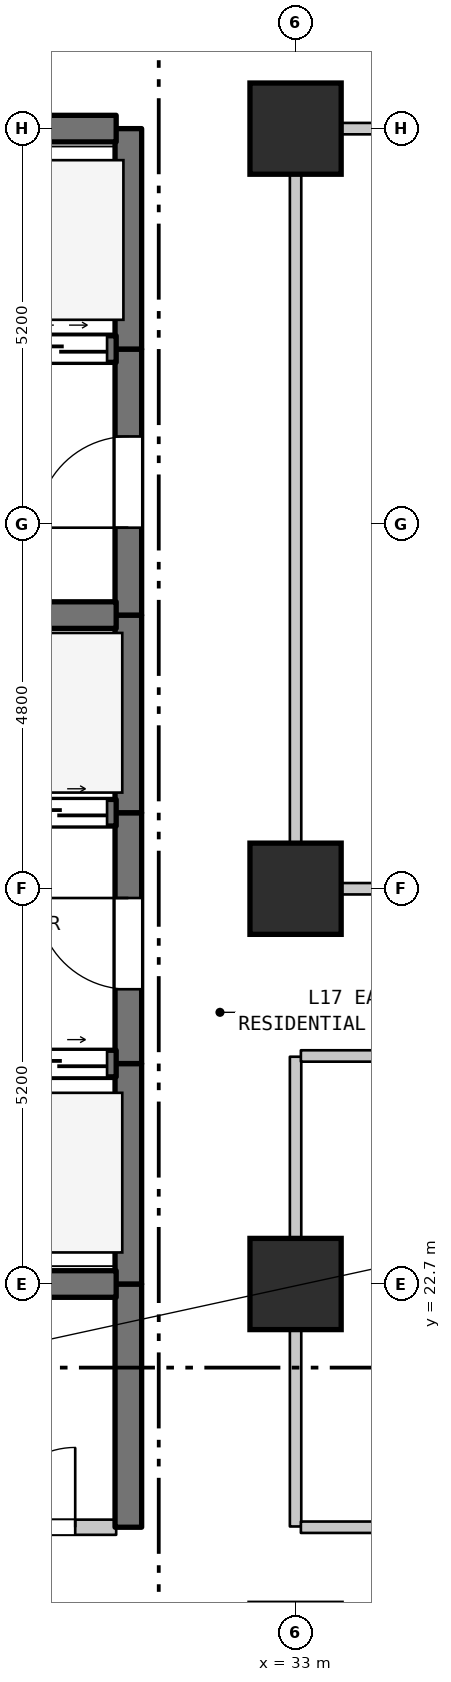
"""IFC4 building model, lengths in metres.
Left out: names, types, materials, properties, quantities, classifications, styles, units other than length and angle.
Written with IfcOpenShell. Run it as: python <this file> out.ifc"""

import sys

from ifc_helpers import new_model, si_unit, direction, frame, frame_2d, origin, origin_2d, place, context, subcontext, project, spatial, rectangle, extrude, element, fill, save


model = new_model("IFC4")
c1 = context("Model", 3, precision=1e-05, world=origin(), true_north=direction((0.0, 1.0)))
c2 = subcontext(c1, "Body", "Model", "MODEL_VIEW")
j1 = project(units=[si_unit("LENGTHUNIT", "METRE"), si_unit("PLANEANGLEUNIT", "RADIAN")], contexts=[c1])
p1 = place(None, origin())
s1 = spatial("IfcSite", under=j1, at=p1, CompositionType="ELEMENT")
p2 = place(p1, origin())
s2 = spatial("IfcBuilding", under=s1, at=p2, CompositionType="ELEMENT")
p3 = place(p2, frame((0.0, 0.0, 73.8)))
s3 = spatial("IfcBuildingStorey", under=s2, at=p3, CompositionType="ELEMENT", Elevation=73.8)
for number, where, z_axis, x_axis in (
    (1, (33.0, 22.7, 0.0), (0.0, 0.0, 1.0), (1.0, 0.0, 0.0)),
    (2, (33.0, 27.9, 0.0), (0.0, 0.0, 1.0), (1.0, 0.0, 0.0)),
    (3, (33.0, 37.9, 0.0), (0.0, 0.0, 1.0), (1.0, 0.0, 0.0)),
):
    element("IfcColumn", number, at=place(p3, frame(where, z_axis=z_axis, x_axis=x_axis)), inside=s3, PredefinedType="COLUMN", context=c2, shape_type="SweptSolid", body=[
        extrude(rectangle(XDim=1.2, YDim=1.2, at=origin_2d()), origin(), (0.0, 0.0, 1.0), 3.7),
    ])
p4 = place(p3, frame((30.8, 19.5, 0.0), z_axis=(0.0, 0.0, 1.0), x_axis=(0.0, 1.0, 0.0)))
e4 = element("IfcWall", 4, at=p4, inside=s3, PredefinedType="SHEAR", context=c2, shape_type="SweptSolid", body=[
    extrude(rectangle(XDim=3.2, YDim=0.35, at=frame_2d((1.6, 0.0))), origin(), (0.0, 0.0, 1.0), 3.385),
])
p5 = place(p3, frame((30.8, 22.7, 0.0), z_axis=(0.0, 0.0, 1.0), x_axis=(0.0, 1.0, 0.0)))
e5 = element("IfcWall", 5, at=p5, inside=s3, PredefinedType="SHEAR", context=c2, shape_type="SweptSolid", body=[
    extrude(rectangle(XDim=2.9, YDim=0.35, at=frame_2d((1.45, 0.0))), origin(), (0.0, 0.0, 1.0), 3.385),
])
p6 = place(p3, frame((30.8, 25.6, 0.0), z_axis=(0.0, 0.0, 1.0), x_axis=(0.0, 1.0, 0.0)))
e6 = element("IfcWall", 6, at=p6, inside=s3, PredefinedType="SHEAR", context=c2, shape_type="SweptSolid", body=[
    extrude(rectangle(XDim=3.3, YDim=0.35, at=frame_2d((1.65, 0.0))), origin(), (0.0, 0.0, 1.0), 3.385),
])
p7 = place(p6, frame((0.978, 0.0, 0.0)))
e7 = element("IfcOpeningElement", 7, at=p7, cuts=e6, PredefinedType="OPENING", context=c2, shape_type="SweptSolid", body=[
    extrude(rectangle(XDim=1.2, YDim=2.2, at=frame_2d((0.6, 1.1))), frame((0.0, 0.185, 0.0), z_axis=(0.0, -1.0, 0.0), x_axis=(1.0, 0.0, 0.0)), (0.0, 0.0, 1.0), 0.37),
])
p8 = place(p3, frame((30.8, 28.9, 0.0), z_axis=(0.0, 0.0, 1.0), x_axis=(0.0, 1.0, 0.0)))
e8 = element("IfcWall", 8, at=p8, inside=s3, PredefinedType="SHEAR", context=c2, shape_type="SweptSolid", body=[
    extrude(rectangle(XDim=2.6, YDim=0.35, at=frame_2d((1.3, 0.0))), origin(), (0.0, 0.0, 1.0), 3.385),
])
p9 = place(p3, frame((30.8, 31.5, 0.0), z_axis=(0.0, 0.0, 1.0), x_axis=(0.0, 1.0, 0.0)))
e9 = element("IfcWall", 9, at=p9, inside=s3, PredefinedType="SHEAR", context=c2, shape_type="SweptSolid", body=[
    extrude(rectangle(XDim=3.5, YDim=0.35, at=frame_2d((1.75, 0.0))), origin(), (0.0, 0.0, 1.0), 3.385),
])
p10 = place(p9, frame((1.15, 0.0, 0.0)))
e10 = element("IfcOpeningElement", 10, at=p10, cuts=e9, PredefinedType="OPENING", context=c2, shape_type="SweptSolid", body=[
    extrude(rectangle(XDim=1.2, YDim=2.2, at=frame_2d((0.6, 1.1))), frame((0.0, 0.185, 0.0), z_axis=(0.0, -1.0, 0.0), x_axis=(1.0, 0.0, 0.0)), (0.0, 0.0, 1.0), 0.37),
])
p11 = place(p3, frame((30.8, 35.0, 0.0), z_axis=(0.0, 0.0, 1.0), x_axis=(0.0, 1.0, 0.0)))
e11 = element("IfcWall", 11, at=p11, inside=s3, PredefinedType="SHEAR", context=c2, shape_type="SweptSolid", body=[
    extrude(rectangle(XDim=2.9, YDim=0.35, at=frame_2d((1.45, 0.0))), origin(), (0.0, 0.0, 1.0), 3.385),
])
p12 = place(p3, frame((33.0, 19.51, 0.0), z_axis=(0.0, 0.0, 1.0), x_axis=(0.0, 1.0, 0.0)))
e12 = element("IfcWall", 12, at=p12, inside=s3, PredefinedType="STANDARD", context=c2, shape_type="SweptSolid", body=[
    extrude(rectangle(XDim=6.18, YDim=0.15, at=frame_2d((3.09, 0.0))), origin(), (0.0, 0.0, 1.0), 2.885),
])
p13 = place(p3, frame((33.0, 27.91, 0.0), z_axis=(0.0, 0.0, 1.0), x_axis=(0.0, 1.0, 0.0)))
e13 = element("IfcWall", 13, at=p13, inside=s3, PredefinedType="STANDARD", context=c2, shape_type="SweptSolid", body=[
    extrude(rectangle(XDim=9.98, YDim=0.15, at=frame_2d((4.99, 0.0))), origin(), (0.0, 0.0, 1.0), 2.885),
])
p14 = place(p3, frame((28.585, 19.5, 0.0), z_axis=(0.0, 0.0, 1.0), x_axis=(1.0, 0.0, 0.0)))
e14 = element("IfcWall", 14, at=p14, inside=s3, PredefinedType="STANDARD", context=c2, shape_type="SweptSolid", body=[
    extrude(rectangle(XDim=2.055, YDim=0.2, at=frame_2d((1.027, 0.0))), origin(), (0.0, 0.0, 1.0), 3.385),
])
p15 = place(p14, frame((0.466, 0.0, 0.0)))
e15 = element("IfcOpeningElement", 15, at=p15, cuts=e14, PredefinedType="OPENING", context=c2, shape_type="SweptSolid", body=[
    extrude(rectangle(XDim=1.05, YDim=2.15, at=frame_2d((0.525, 1.075))), frame((0.0, 0.11, 0.0), z_axis=(0.0, -1.0, 0.0), x_axis=(1.0, 0.0, 0.0)), (0.0, 0.0, 1.0), 0.22),
])
p16 = place(p3, frame((33.07, 19.5, 0.0), z_axis=(0.0, 0.0, 1.0), x_axis=(1.0, 0.0, 0.0)))
e16 = element("IfcWall", 16, at=p16, inside=s3, PredefinedType="STANDARD", context=c2, shape_type="SweptSolid", body=[
    extrude(rectangle(XDim=33.27, YDim=0.15, at=frame_2d((16.635, 0.0))), origin(), (0.0, 0.0, 1.0), 3.385),
])
p17 = place(p16, frame((16.065, 0.0, 0.0)))
e17 = element("IfcOpeningElement", 17, at=p17, cuts=e16, PredefinedType="OPENING", context=c2, shape_type="SweptSolid", body=[
    extrude(rectangle(XDim=1.0, YDim=2.15, at=frame_2d((0.5, 1.075))), frame((0.0, 0.085, 0.0), z_axis=(0.0, -1.0, 0.0), x_axis=(1.0, 0.0, 0.0)), (0.0, 0.0, 1.0), 0.17),
])
p18 = place(p3, frame((28.585, 22.7, 0.0), z_axis=(0.0, 0.0, 1.0), x_axis=(1.0, 0.0, 0.0)))
e18 = element("IfcWall", 18, at=p18, inside=s3, PredefinedType="SHEAR", context=c2, shape_type="SweptSolid", body=[
    extrude(rectangle(XDim=2.055, YDim=0.35, at=frame_2d((1.027, 0.0))), origin(), (0.0, 0.0, 1.0), 3.385),
])
p19 = place(p3, frame((27.46, 25.6, 0.0), z_axis=(0.0, 0.0, 1.0), x_axis=(1.0, 0.0, 0.0)))
e19 = element("IfcWall", 19, at=p19, inside=s3, PredefinedType="SHEAR", context=c2, shape_type="SweptSolid", body=[
    extrude(rectangle(XDim=3.18, YDim=0.35, at=frame_2d((1.59, 0.0))), origin(), (0.0, 0.0, 1.0), 3.385),
])
p20 = place(p19, frame((0.12, 0.0, 0.0)))
e20 = element("IfcOpeningElement", 20, at=p20, cuts=e19, PredefinedType="OPENING", context=c2, shape_type="SweptSolid", body=[
    extrude(rectangle(XDim=1.25, YDim=2.2, at=frame_2d((0.625, 1.1))), frame((0.0, 0.185, 0.0), z_axis=(0.0, -1.0, 0.0), x_axis=(1.0, 0.0, 0.0)), (0.0, 0.0, 1.0), 0.37),
])
p21 = place(p19, frame((1.81, 0.0, 0.0)))
e21 = element("IfcOpeningElement", 21, at=p21, cuts=e19, PredefinedType="OPENING", context=c2, shape_type="SweptSolid", body=[
    extrude(rectangle(XDim=1.25, YDim=2.2, at=frame_2d((0.625, 1.1))), frame((0.0, 0.185, 0.0), z_axis=(0.0, -1.0, 0.0), x_axis=(1.0, 0.0, 0.0)), (0.0, 0.0, 1.0), 0.37),
])
p22 = place(p3, frame((33.07, 25.7, 0.0), z_axis=(0.0, 0.0, 1.0), x_axis=(1.0, 0.0, 0.0)))
e22 = element("IfcWall", 22, at=p22, inside=s3, PredefinedType="STANDARD", context=c2, shape_type="SweptSolid", body=[
    extrude(rectangle(XDim=30.87, YDim=0.15, at=frame_2d((15.435, 0.0))), origin(), (0.0, 0.0, 1.0), 3.385),
])
p23 = place(p3, frame((33.07, 27.9, 0.0), z_axis=(0.0, 0.0, 1.0), x_axis=(1.0, 0.0, 0.0)))
e23 = element("IfcWall", 23, at=p23, inside=s3, PredefinedType="STANDARD", context=c2, shape_type="SweptSolid", body=[
    extrude(rectangle(XDim=30.87, YDim=0.15, at=frame_2d((15.435, 0.0))), origin(), (0.0, 0.0, 1.0), 2.885),
])
p24 = place(p23, frame((14.935, 0.0, 0.0)))
e24 = element("IfcOpeningElement", 24, at=p24, cuts=e23, PredefinedType="OPENING", context=c2, shape_type="SweptSolid", body=[
    extrude(rectangle(XDim=1.0, YDim=2.15, at=frame_2d((0.5, 1.075))), frame((0.0, 0.085, 0.0), z_axis=(0.0, -1.0, 0.0), x_axis=(1.0, 0.0, 0.0)), (0.0, 0.0, 1.0), 0.17),
])
p25 = place(p3, frame((27.46, 28.9, 0.0), z_axis=(0.0, 0.0, 1.0), x_axis=(1.0, 0.0, 0.0)))
e25 = element("IfcWall", 25, at=p25, inside=s3, PredefinedType="SHEAR", context=c2, shape_type="SweptSolid", body=[
    extrude(rectangle(XDim=3.18, YDim=0.35, at=frame_2d((1.59, 0.0))), origin(), (0.0, 0.0, 1.0), 3.385),
])
p26 = place(p25, frame((0.12, 0.0, 0.0)))
e26 = element("IfcOpeningElement", 26, at=p26, cuts=e25, PredefinedType="OPENING", context=c2, shape_type="SweptSolid", body=[
    extrude(rectangle(XDim=1.25, YDim=2.2, at=frame_2d((0.625, 1.1))), frame((0.0, 0.185, 0.0), z_axis=(0.0, -1.0, 0.0), x_axis=(1.0, 0.0, 0.0)), (0.0, 0.0, 1.0), 0.37),
])
p27 = place(p25, frame((1.81, 0.0, 0.0)))
e27 = element("IfcOpeningElement", 27, at=p27, cuts=e25, PredefinedType="OPENING", context=c2, shape_type="SweptSolid", body=[
    extrude(rectangle(XDim=1.25, YDim=2.2, at=frame_2d((0.625, 1.1))), frame((0.0, 0.185, 0.0), z_axis=(0.0, -1.0, 0.0), x_axis=(1.0, 0.0, 0.0)), (0.0, 0.0, 1.0), 0.37),
])
p28 = place(p3, frame((27.46, 31.5, 0.0), z_axis=(0.0, 0.0, 1.0), x_axis=(1.0, 0.0, 0.0)))
e28 = element("IfcWall", 28, at=p28, inside=s3, PredefinedType="SHEAR", context=c2, shape_type="SweptSolid", body=[
    extrude(rectangle(XDim=3.18, YDim=0.35, at=frame_2d((1.59, 0.0))), origin(), (0.0, 0.0, 1.0), 3.385),
])
p29 = place(p3, frame((19.16, 35.0, 0.0), z_axis=(0.0, 0.0, 1.0), x_axis=(1.0, 0.0, 0.0)))
e29 = element("IfcWall", 29, at=p29, inside=s3, PredefinedType="SHEAR", context=c2, shape_type="SweptSolid", body=[
    extrude(rectangle(XDim=11.48, YDim=0.35, at=frame_2d((5.74, 0.0))), origin(), (0.0, 0.0, 1.0), 3.385),
])
p30 = place(p29, frame((0.365, 0.0, 0.0)))
e30 = element("IfcOpeningElement", 30, at=p30, cuts=e29, PredefinedType="OPENING", context=c2, shape_type="SweptSolid", body=[
    extrude(rectangle(XDim=1.35, YDim=2.2, at=frame_2d((0.675, 1.1))), frame((0.0, 0.185, 0.0), z_axis=(0.0, -1.0, 0.0), x_axis=(1.0, 0.0, 0.0)), (0.0, 0.0, 1.0), 0.37),
])
p31 = place(p29, frame((2.765, 0.0, 0.0)))
e31 = element("IfcOpeningElement", 31, at=p31, cuts=e29, PredefinedType="OPENING", context=c2, shape_type="SweptSolid", body=[
    extrude(rectangle(XDim=1.35, YDim=2.2, at=frame_2d((0.675, 1.1))), frame((0.0, 0.185, 0.0), z_axis=(0.0, -1.0, 0.0), x_axis=(1.0, 0.0, 0.0)), (0.0, 0.0, 1.0), 0.37),
])
p32 = place(p29, frame((4.915, 0.0, 0.0)))
e32 = element("IfcOpeningElement", 32, at=p32, cuts=e29, PredefinedType="OPENING", context=c2, shape_type="SweptSolid", body=[
    extrude(rectangle(XDim=1.2, YDim=2.2, at=frame_2d((0.6, 1.1))), frame((0.0, 0.185, 0.0), z_axis=(0.0, -1.0, 0.0), x_axis=(1.0, 0.0, 0.0)), (0.0, 0.0, 1.0), 0.37),
])
p33 = place(p29, frame((6.665, 0.0, 0.0)))
e33 = element("IfcOpeningElement", 33, at=p33, cuts=e29, PredefinedType="OPENING", context=c2, shape_type="SweptSolid", body=[
    extrude(rectangle(XDim=1.2, YDim=2.2, at=frame_2d((0.6, 1.1))), frame((0.0, 0.185, 0.0), z_axis=(0.0, -1.0, 0.0), x_axis=(1.0, 0.0, 0.0)), (0.0, 0.0, 1.0), 0.37),
])
p34 = place(p29, frame((8.415, 0.0, 0.0)))
e34 = element("IfcOpeningElement", 34, at=p34, cuts=e29, PredefinedType="OPENING", context=c2, shape_type="SweptSolid", body=[
    extrude(rectangle(XDim=1.2, YDim=2.2, at=frame_2d((0.6, 1.1))), frame((0.0, 0.185, 0.0), z_axis=(0.0, -1.0, 0.0), x_axis=(1.0, 0.0, 0.0)), (0.0, 0.0, 1.0), 0.37),
])
p35 = place(p29, frame((10.16, 0.0, 0.0)))
e35 = element("IfcOpeningElement", 35, at=p35, cuts=e29, PredefinedType="OPENING", context=c2, shape_type="SweptSolid", body=[
    extrude(rectangle(XDim=1.2, YDim=2.2, at=frame_2d((0.6, 1.1))), frame((0.0, 0.185, 0.0), z_axis=(0.0, -1.0, 0.0), x_axis=(1.0, 0.0, 0.0)), (0.0, 0.0, 1.0), 0.37),
])
p36 = place(p3, frame((19.16, 37.9, 0.0), z_axis=(0.0, 0.0, 1.0), x_axis=(1.0, 0.0, 0.0)))
e36 = element("IfcWall", 36, at=p36, inside=s3, PredefinedType="SHEAR", context=c2, shape_type="SweptSolid", body=[
    extrude(rectangle(XDim=11.48, YDim=0.35, at=frame_2d((5.74, 0.0))), origin(), (0.0, 0.0, 1.0), 3.385),
])
p37 = place(p3, frame((33.07, 37.9, 0.0), z_axis=(0.0, 0.0, 1.0), x_axis=(1.0, 0.0, 0.0)))
e37 = element("IfcWall", 37, at=p37, inside=s3, PredefinedType="STANDARD", context=c2, shape_type="SweptSolid", body=[
    extrude(rectangle(XDim=26.935, YDim=0.15, at=frame_2d((13.467, 0.0))), origin(), (0.0, 0.0, 1.0), 3.385),
])
p38 = place(p7, origin())
e38 = element("IfcDoor", 38, at=p38, inside=s3, OperationType="SINGLE_SWING_RIGHT", PredefinedType="DOOR", context=c2, shape_type="SweptSolid", body=[
    extrude(rectangle(XDim=1.2, YDim=2.2, at=frame_2d((0.6, 1.1))), frame((0.0, 0.025, 0.0), z_axis=(0.0, -1.0, 0.0), x_axis=(1.0, 0.0, 0.0)), (0.0, 0.0, 1.0), 0.05),
])
fill(e7, e38)
p39 = place(p10, origin())
e39 = element("IfcDoor", 39, at=p39, inside=s3, OperationType="SINGLE_SWING_LEFT", PredefinedType="DOOR", context=c2, shape_type="SweptSolid", body=[
    extrude(rectangle(XDim=1.2, YDim=2.2, at=frame_2d((0.6, 1.1))), frame((0.0, 0.025, 0.0), z_axis=(0.0, -1.0, 0.0), x_axis=(1.0, 0.0, 0.0)), (0.0, 0.0, 1.0), 0.05),
])
fill(e10, e39)
p40 = place(p15, origin())
e40 = element("IfcDoor", 40, at=p40, inside=s3, OperationType="SINGLE_SWING_RIGHT", PredefinedType="DOOR", context=c2, shape_type="SweptSolid", body=[
    extrude(rectangle(XDim=1.05, YDim=2.15, at=frame_2d((0.525, 1.075))), frame((0.0, 0.025, 0.0), z_axis=(0.0, -1.0, 0.0), x_axis=(1.0, 0.0, 0.0)), (0.0, 0.0, 1.0), 0.05),
])
fill(e15, e40)
p41 = place(p21, origin())
e41 = element("IfcDoor", 41, at=p41, inside=s3, OperationType="DOUBLE_DOOR_SLIDING", PredefinedType="DOOR", context=c2, shape_type="SweptSolid", body=[
    extrude(rectangle(XDim=1.25, YDim=2.2, at=frame_2d((0.625, 1.1))), frame((0.0, 0.025, 0.0), z_axis=(0.0, -1.0, 0.0), x_axis=(1.0, 0.0, 0.0)), (0.0, 0.0, 1.0), 0.05),
])
fill(e21, e41)
p42 = place(p27, origin())
e42 = element("IfcDoor", 42, at=p42, inside=s3, OperationType="DOUBLE_DOOR_SLIDING", PredefinedType="DOOR", context=c2, shape_type="SweptSolid", body=[
    extrude(rectangle(XDim=1.25, YDim=2.2, at=frame_2d((0.625, 1.1))), frame((0.0, 0.025, 0.0), z_axis=(0.0, -1.0, 0.0), x_axis=(1.0, 0.0, 0.0)), (0.0, 0.0, 1.0), 0.05),
])
fill(e27, e42)
p43 = place(p35, origin())
e43 = element("IfcDoor", 43, at=p43, inside=s3, OperationType="DOUBLE_DOOR_SLIDING", PredefinedType="DOOR", context=c2, shape_type="SweptSolid", body=[
    extrude(rectangle(XDim=1.2, YDim=2.2, at=frame_2d((0.6, 1.1))), frame((0.0, 0.025, 0.0), z_axis=(0.0, -1.0, 0.0), x_axis=(1.0, 0.0, 0.0)), (0.0, 0.0, 1.0), 0.05),
])
fill(e35, e43)
save(model, sys.argv[1])
